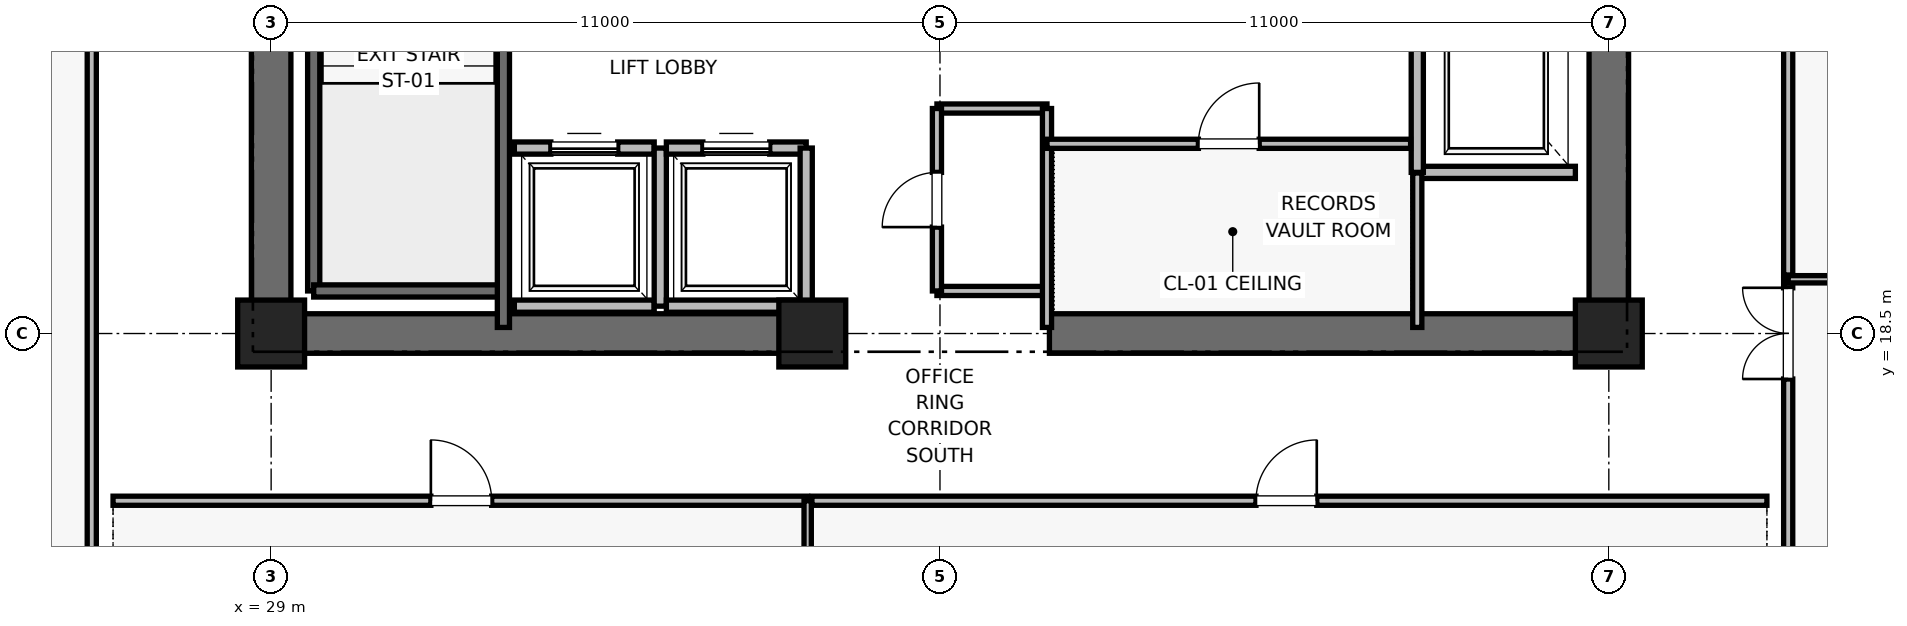
"""IFC4 building model, lengths in metres.
Left out: names, types, materials, properties, quantities, classifications, styles, units other than length and angle.
Written with IfcOpenShell. Run it as: python <this file> out.ifc"""

import sys

from ifc_helpers import new_model, si_unit, direction, frame, frame_2d, origin, origin_2d, place, context, subcontext, project, spatial, rectangle, extrude, element, fill, save


model = new_model("IFC4")
c1 = context("Model", 3, precision=1e-05, world=origin(), true_north=direction((0.0, 1.0)))
c2 = subcontext(c1, "Body", "Model", "MODEL_VIEW")
j1 = project(units=[si_unit("LENGTHUNIT", "METRE"), si_unit("PLANEANGLEUNIT", "RADIAN")], contexts=[c1])
p1 = place(None, origin())
s1 = spatial("IfcSite", under=j1, at=p1, CompositionType="ELEMENT")
p2 = place(p1, origin())
s2 = spatial("IfcBuilding", under=s1, at=p2, CompositionType="ELEMENT")
p3 = place(p2, frame((0.0, 0.0, 55.6)))
s3 = spatial("IfcBuildingStorey", under=s2, at=p3, CompositionType="ELEMENT", Elevation=55.6)
for number, where, z_axis, x_axis in (
    (1, (29.0, 18.5, 0.0), (0.0, 0.0, 1.0), (1.0, 0.0, 0.0)),
    (2, (51.0, 18.5, 0.0), (0.0, 0.0, 1.0), (1.0, 0.0, 0.0)),
    (3, (37.9, 18.5, 0.0), (0.0, 0.0, 1.0), (1.0, 0.0, 0.0)),
):
    element("IfcColumn", number, at=place(p3, frame(where, z_axis=z_axis, x_axis=x_axis)), inside=s3, PredefinedType="PILASTER", context=c2, shape_type="SweptSolid", body=[
        extrude(rectangle(XDim=1.1, YDim=1.1, at=origin_2d()), origin(), (0.0, 0.0, 1.0), 4.0),
    ])
for number, where, z_axis, x_axis in (
    (4, (29.0, 18.5, 0.0), (0.0, 0.0, 1.0), (1.0, 0.0, 0.0)),
    (5, (41.8, 18.5, 0.0), (0.0, 0.0, 1.0), (1.0, 0.0, 0.0)),
):
    element("IfcWall", number, at=place(p3, frame(where, z_axis=z_axis, x_axis=x_axis)), inside=s3, PredefinedType="SHEAR", context=c2, shape_type="SweptSolid", body=[
        extrude(rectangle(XDim=9.2, YDim=0.65, at=frame_2d((4.6, 0.0))), origin(), (0.0, 0.0, 1.0), 3.76),
    ])
p4 = place(p3, frame((29.0, 18.5, 0.0), z_axis=(0.0, 0.0, 1.0), x_axis=(0.0, 1.0, 0.0)))
e6 = element("IfcWall", 6, at=p4, inside=s3, PredefinedType="SHEAR", context=c2, shape_type="SweptSolid", body=[
    extrude(rectangle(XDim=8.8, YDim=0.65, at=frame_2d((4.4, 0.0))), origin(), (0.0, 0.0, 1.0), 3.76),
])
p5 = place(p3, frame((51.0, 18.5, 0.0), z_axis=(0.0, 0.0, 1.0), x_axis=(0.0, 1.0, 0.0)))
e7 = element("IfcWall", 7, at=p5, inside=s3, PredefinedType="SHEAR", context=c2, shape_type="SweptSolid", body=[
    extrude(rectangle(XDim=5.8, YDim=0.65, at=frame_2d((2.9, 0.0))), origin(), (0.0, 0.0, 1.0), 3.76),
])
p6 = place(p3, frame((29.7, 19.2, 0.0), z_axis=(0.0, 0.0, 1.0), x_axis=(0.0, 1.0, 0.0)))
e8 = element("IfcWall", 8, at=p6, inside=s3, PredefinedType="SOLIDWALL", context=c2, shape_type="SweptSolid", body=[
    extrude(rectangle(XDim=8.15, YDim=0.2, at=frame_2d((4.075, 0.0))), origin(), (0.0, 0.0, 1.0), 3.76),
])
p7 = place(p3, frame((29.7, 19.2, 0.0), z_axis=(0.0, 0.0, 1.0), x_axis=(1.0, 0.0, 0.0)))
e9 = element("IfcWall", 9, at=p7, inside=s3, PredefinedType="SOLIDWALL", context=c2, shape_type="SweptSolid", body=[
    extrude(rectangle(XDim=3.12, YDim=0.2, at=frame_2d((1.56, 0.0))), origin(), (0.0, 0.0, 1.0), 3.76),
])
p8 = place(p3, frame((32.82, 18.6, 0.0), z_axis=(0.0, 0.0, 1.0), x_axis=(0.0, 1.0, 0.0)))
e10 = element("IfcWall", 10, at=p8, inside=s3, PredefinedType="SOLIDWALL", context=c2, shape_type="SweptSolid", body=[
    extrude(rectangle(XDim=8.78, YDim=0.2, at=frame_2d((4.39, 0.0))), origin(), (0.0, 0.0, 1.0), 3.76),
])
p9 = place(p3, frame((47.85, 21.15, 0.0), z_axis=(0.0, 0.0, 1.0), x_axis=(1.0, 0.0, 0.0)))
e11 = element("IfcWall", 11, at=p9, inside=s3, PredefinedType="SOLIDWALL", context=c2, shape_type="SweptSolid", body=[
    extrude(rectangle(XDim=2.6, YDim=0.2, at=frame_2d((1.3, 0.0))), origin(), (0.0, 0.0, 1.0), 3.76),
])
p10 = place(p3, frame((47.85, 24.15, 0.0), z_axis=(0.0, 0.0, 1.0), x_axis=(0.0, -1.0, 0.0)))
e12 = element("IfcWall", 12, at=p10, inside=s3, PredefinedType="SOLIDWALL", context=c2, shape_type="SweptSolid", body=[
    extrude(rectangle(XDim=3.0, YDim=0.2, at=frame_2d((1.5, 0.0))), origin(), (0.0, 0.0, 1.0), 3.76),
])
p11 = place(p3, frame((33.0, 18.95, 0.0), z_axis=(0.0, 0.0, 1.0), x_axis=(1.0, 0.0, 0.0)))
e13 = element("IfcWall", 13, at=p11, inside=s3, PredefinedType="SOLIDWALL", context=c2, shape_type="SweptSolid", body=[
    extrude(rectangle(XDim=2.3, YDim=0.2, at=frame_2d((1.15, 0.0))), origin(), (0.0, 0.0, 1.0), 3.76),
])
p12 = place(p3, frame((35.3, 21.55, 0.0), z_axis=(0.0, 0.0, 1.0), x_axis=(-1.0, 0.0, 0.0)))
e14 = element("IfcWall", 14, at=p12, inside=s3, PredefinedType="SOLIDWALL", context=c2, shape_type="SweptSolid", body=[
    extrude(rectangle(XDim=2.3, YDim=0.2, at=frame_2d((1.15, 0.0))), origin(), (0.0, 0.0, 1.0), 3.76),
])
p13 = place(p12, frame((0.6, 0.0, 0.0)))
e15 = element("IfcOpeningElement", 15, at=p13, cuts=e14, PredefinedType="OPENING", context=c2, shape_type="SweptSolid", body=[
    extrude(rectangle(XDim=1.1, YDim=2.2, at=frame_2d((0.55, 1.1))), frame((0.0, 0.1, 0.0), z_axis=(0.0, -1.0, 0.0), x_axis=(1.0, 0.0, 0.0)), (0.0, 0.0, 1.0), 0.2),
])
p14 = place(p3, frame((35.4, 18.95, 0.0), z_axis=(0.0, 0.0, 1.0), x_axis=(0.0, 1.0, 0.0)))
e16 = element("IfcWall", 16, at=p14, inside=s3, PredefinedType="SOLIDWALL", context=c2, shape_type="SweptSolid", body=[
    extrude(rectangle(XDim=2.6, YDim=0.2, at=frame_2d((1.3, 0.0))), origin(), (0.0, 0.0, 1.0), 3.76),
])
p15 = place(p3, frame((35.5, 18.95, 0.0), z_axis=(0.0, 0.0, 1.0), x_axis=(1.0, 0.0, 0.0)))
e17 = element("IfcWall", 17, at=p15, inside=s3, PredefinedType="SOLIDWALL", context=c2, shape_type="SweptSolid", body=[
    extrude(rectangle(XDim=2.3, YDim=0.2, at=frame_2d((1.15, 0.0))), origin(), (0.0, 0.0, 1.0), 2.54),
])
p16 = place(p3, frame((37.8, 21.55, 0.0), z_axis=(0.0, 0.0, 1.0), x_axis=(-1.0, 0.0, 0.0)))
e18 = element("IfcWall", 18, at=p16, inside=s3, PredefinedType="SOLIDWALL", context=c2, shape_type="SweptSolid", body=[
    extrude(rectangle(XDim=2.3, YDim=0.2, at=frame_2d((1.15, 0.0))), origin(), (0.0, 0.0, 1.0), 3.76),
])
p17 = place(p16, frame((0.6, 0.0, 0.0)))
e19 = element("IfcOpeningElement", 19, at=p17, cuts=e18, PredefinedType="OPENING", context=c2, shape_type="SweptSolid", body=[
    extrude(rectangle(XDim=1.1, YDim=2.2, at=frame_2d((0.55, 1.1))), frame((0.0, 0.1, 0.0), z_axis=(0.0, -1.0, 0.0), x_axis=(1.0, 0.0, 0.0)), (0.0, 0.0, 1.0), 0.2),
])
p18 = place(p3, frame((37.8, 18.95, 0.0), z_axis=(0.0, 0.0, 1.0), x_axis=(0.0, 1.0, 0.0)))
e20 = element("IfcWall", 20, at=p18, inside=s3, PredefinedType="SOLIDWALL", context=c2, shape_type="SweptSolid", body=[
    extrude(rectangle(XDim=2.6, YDim=0.2, at=frame_2d((1.3, 0.0))), origin(), (0.0, 0.0, 1.0), 2.54),
])
for number, where, z_axis, x_axis in (
    (21, (39.95, 19.2, 0.0), (0.0, 0.0, 1.0), (1.0, 0.0, 0.0)),
    (22, (39.95, 22.2, 0.0), (0.0, 0.0, 1.0), (1.0, 0.0, 0.0)),
):
    element("IfcWall", number, at=place(p3, frame(where, z_axis=z_axis, x_axis=x_axis)), inside=s3, PredefinedType="PARTITIONING", context=c2, shape_type="SweptSolid", body=[
        extrude(rectangle(XDim=1.81, YDim=0.15, at=frame_2d((0.905, 0.0))), origin(), (0.0, 0.0, 1.0), 2.85),
    ])
p19 = place(p3, frame((41.76, 18.6, 0.0), z_axis=(0.0, 0.0, 1.0), x_axis=(0.0, 1.0, 0.0)))
e23 = element("IfcWall", 23, at=p19, inside=s3, PredefinedType="PARTITIONING", context=c2, shape_type="SweptSolid", body=[
    extrude(rectangle(XDim=3.6, YDim=0.15, at=frame_2d((1.8, 0.0))), origin(), (0.0, 0.0, 1.0), 2.54),
])
p20 = place(p3, frame((39.95, 19.2, 0.0), z_axis=(0.0, 0.0, 1.0), x_axis=(0.0, 1.0, 0.0)))
e24 = element("IfcWall", 24, at=p20, inside=s3, PredefinedType="PARTITIONING", context=c2, shape_type="SweptSolid", body=[
    extrude(rectangle(XDim=3.0, YDim=0.15, at=frame_2d((1.5, 0.0))), origin(), (0.0, 0.0, 1.0), 2.85),
])
p21 = place(p20, frame((1.05, 0.0, 0.0)))
e25 = element("IfcOpeningElement", 25, at=p21, cuts=e24, PredefinedType="OPENING", context=c2, shape_type="SweptSolid", body=[
    extrude(rectangle(XDim=0.9, YDim=2.1, at=frame_2d((0.45, 1.05))), frame((0.0, 0.075, 0.0), z_axis=(0.0, -1.0, 0.0), x_axis=(1.0, 0.0, 0.0)), (0.0, 0.0, 1.0), 0.15),
])
p22 = place(p3, frame((47.85, 18.6, 0.0), z_axis=(0.0, 0.0, 1.0), x_axis=(0.0, 1.0, 0.0)))
e26 = element("IfcWall", 26, at=p22, inside=s3, PredefinedType="PARTITIONING", context=c2, shape_type="SweptSolid", body=[
    extrude(rectangle(XDim=2.54, YDim=0.15, at=frame_2d((1.27, 0.0))), origin(), (0.0, 0.0, 1.0), 2.85),
])
p23 = place(p3, frame((41.76, 21.62, 0.0), z_axis=(0.0, 0.0, 1.0), x_axis=(1.0, 0.0, 0.0)))
e27 = element("IfcWall", 27, at=p23, inside=s3, PredefinedType="PARTITIONING", context=c2, shape_type="SweptSolid", body=[
    extrude(rectangle(XDim=5.98, YDim=0.15, at=frame_2d((2.99, 0.0))), origin(), (0.0, 0.0, 1.0), 2.85),
])
p24 = place(p23, frame((2.49, 0.0, 0.0)))
e28 = element("IfcOpeningElement", 28, at=p24, cuts=e27, PredefinedType="OPENING", context=c2, shape_type="SweptSolid", body=[
    extrude(rectangle(XDim=1.0, YDim=2.15, at=frame_2d((0.5, 1.075))), frame((0.0, 0.075, 0.0), z_axis=(0.0, -1.0, 0.0), x_axis=(1.0, 0.0, 0.0)), (0.0, 0.0, 1.0), 0.15),
])
p25 = place(p3, frame((26.4, 15.75, 0.0), z_axis=(0.0, 0.0, 1.0), x_axis=(1.0, 0.0, 0.0)))
e29 = element("IfcWall", 29, at=p25, inside=s3, PredefinedType="PARTITIONING", context=c2, shape_type="SweptSolid", body=[
    extrude(rectangle(XDim=11.424, YDim=0.15, at=frame_2d((5.712, 0.0))), origin(), (0.0, 0.0, 1.0), 2.85),
])
p26 = place(p25, frame((5.227, 0.0, 0.0)))
e30 = element("IfcOpeningElement", 30, at=p26, cuts=e29, PredefinedType="OPENING", context=c2, shape_type="SweptSolid", body=[
    extrude(rectangle(XDim=1.0, YDim=2.15, at=frame_2d((0.5, 1.075))), frame((0.0, 0.075, 0.0), z_axis=(0.0, -1.0, 0.0), x_axis=(1.0, 0.0, 0.0)), (0.0, 0.0, 1.0), 0.15),
])
p27 = place(p3, frame((37.824, 5.373, 0.0), z_axis=(0.0, 0.0, 1.0), x_axis=(0.0, 1.0, 0.0)))
e31 = element("IfcWall", 31, at=p27, inside=s3, PredefinedType="PARTITIONING", context=c2, shape_type="SweptSolid", body=[
    extrude(rectangle(XDim=10.377, YDim=0.12, at=frame_2d((5.188, 0.0))), origin(), (0.0, 0.0, 1.0), 2.39),
])
p28 = place(p3, frame((37.894, 15.75, 0.0), z_axis=(0.0, 0.0, 1.0), x_axis=(1.0, 0.0, 0.0)))
e32 = element("IfcWall", 32, at=p28, inside=s3, PredefinedType="PARTITIONING", context=c2, shape_type="SweptSolid", body=[
    extrude(rectangle(XDim=15.706, YDim=0.15, at=frame_2d((7.853, 0.0))), origin(), (0.0, 0.0, 1.0), 2.85),
])
p29 = place(p28, frame((7.303, 0.0, 0.0)))
e33 = element("IfcOpeningElement", 33, at=p29, cuts=e32, PredefinedType="OPENING", context=c2, shape_type="SweptSolid", body=[
    extrude(rectangle(XDim=1.0, YDim=2.15, at=frame_2d((0.5, 1.075))), frame((0.0, 0.075, 0.0), z_axis=(0.0, -1.0, 0.0), x_axis=(1.0, 0.0, 0.0)), (0.0, 0.0, 1.0), 0.15),
])
p30 = place(p3, frame((26.05, 9.073, 0.0), z_axis=(0.0, 0.0, 1.0), x_axis=(0.0, 1.0, 0.0)))
e34 = element("IfcWall", 34, at=p30, inside=s3, PredefinedType="PARTITIONING", context=c2, shape_type="SweptSolid", body=[
    extrude(rectangle(XDim=21.376, YDim=0.15, at=frame_2d((10.688, 0.0))), origin(), (0.0, 0.0, 1.0), 2.85),
])
p31 = place(p30, frame((14.917, 0.0, 0.0)))
e35 = element("IfcOpeningElement", 35, at=p31, cuts=e34, PredefinedType="OPENING", context=c2, shape_type="SweptSolid", body=[
    extrude(rectangle(XDim=1.0, YDim=2.15, at=frame_2d((0.5, 1.075))), frame((0.0, 0.075, 0.0), z_axis=(0.0, -1.0, 0.0), x_axis=(1.0, 0.0, 0.0)), (0.0, 0.0, 1.0), 0.15),
])
p32 = place(p3, frame((53.95, 9.073, 0.0), z_axis=(0.0, 0.0, 1.0), x_axis=(0.0, 1.0, 0.0)))
e36 = element("IfcWall", 36, at=p32, inside=s3, PredefinedType="PARTITIONING", context=c2, shape_type="SweptSolid", body=[
    extrude(rectangle(XDim=10.319, YDim=0.15, at=frame_2d((5.16, 0.0))), origin(), (0.0, 0.0, 1.0), 2.85),
])
p33 = place(p32, frame((8.679, 0.0, 0.0)))
e37 = element("IfcOpeningElement", 37, at=p33, cuts=e36, PredefinedType="OPENING", context=c2, shape_type="SweptSolid", body=[
    extrude(rectangle(XDim=1.5, YDim=2.25, at=frame_2d((0.75, 1.125))), frame((0.0, 0.075, 0.0), z_axis=(0.0, -1.0, 0.0), x_axis=(1.0, 0.0, 0.0)), (0.0, 0.0, 1.0), 0.15),
])
p34 = place(p3, frame((53.95, 19.392, 0.0), z_axis=(0.0, 0.0, 1.0), x_axis=(1.0, 0.0, 0.0)))
e38 = element("IfcWall", 38, at=p34, inside=s3, PredefinedType="PARTITIONING", context=c2, shape_type="SweptSolid", body=[
    extrude(rectangle(XDim=11.646, YDim=0.12, at=frame_2d((5.823, 0.0))), origin(), (0.0, 0.0, 1.0), 2.85),
])
p35 = place(p3, frame((53.95, 19.462, 0.0), z_axis=(0.0, 0.0, 1.0), x_axis=(0.0, 1.0, 0.0)))
e39 = element("IfcWall", 39, at=p35, inside=s3, PredefinedType="PARTITIONING", context=c2, shape_type="SweptSolid", body=[
    extrude(rectangle(XDim=12.461, YDim=0.15, at=frame_2d((6.23, 0.0))), origin(), (0.0, 0.0, 1.0), 2.85),
])
p36 = place(p35, frame((5.695, 0.0, 0.0)))
e40 = element("IfcOpeningElement", 40, at=p36, cuts=e39, PredefinedType="OPENING", context=c2, shape_type="SweptSolid", body=[
    extrude(rectangle(XDim=1.0, YDim=2.15, at=frame_2d((0.5, 1.075))), frame((0.0, 0.075, 0.0), z_axis=(0.0, -1.0, 0.0), x_axis=(1.0, 0.0, 0.0)), (0.0, 0.0, 1.0), 0.15),
])
p37 = place(p13, origin())
e41 = element("IfcDoor", 41, at=p37, inside=s3, OperationType="SLIDING_TO_RIGHT", PredefinedType="DOOR", context=c2, shape_type="SweptSolid", body=[
    extrude(rectangle(XDim=1.1, YDim=2.2, at=frame_2d((0.55, 1.1))), frame((0.0, 0.025, 0.0), z_axis=(0.0, -1.0, 0.0), x_axis=(1.0, 0.0, 0.0)), (0.0, 0.0, 1.0), 0.05),
])
fill(e15, e41)
p38 = place(p17, origin())
e42 = element("IfcDoor", 42, at=p38, inside=s3, OperationType="SLIDING_TO_RIGHT", PredefinedType="DOOR", context=c2, shape_type="SweptSolid", body=[
    extrude(rectangle(XDim=1.1, YDim=2.2, at=frame_2d((0.55, 1.1))), frame((0.0, 0.025, 0.0), z_axis=(0.0, -1.0, 0.0), x_axis=(1.0, 0.0, 0.0)), (0.0, 0.0, 1.0), 0.05),
])
fill(e19, e42)
p39 = place(p21, origin())
e43 = element("IfcDoor", 43, at=p39, inside=s3, OperationType="SINGLE_SWING_LEFT", PredefinedType="DOOR", context=c2, shape_type="SweptSolid", body=[
    extrude(rectangle(XDim=0.9, YDim=2.1, at=frame_2d((0.45, 1.05))), frame((0.0, 0.025, 0.0), z_axis=(0.0, -1.0, 0.0), x_axis=(1.0, 0.0, 0.0)), (0.0, 0.0, 1.0), 0.05),
])
fill(e25, e43)
p40 = place(p24, origin())
e44 = element("IfcDoor", 44, at=p40, inside=s3, OperationType="SINGLE_SWING_RIGHT", PredefinedType="DOOR", context=c2, shape_type="SweptSolid", body=[
    extrude(rectangle(XDim=1.0, YDim=2.15, at=frame_2d((0.5, 1.075))), frame((0.0, 0.025, 0.0), z_axis=(0.0, -1.0, 0.0), x_axis=(1.0, 0.0, 0.0)), (0.0, 0.0, 1.0), 0.05),
])
fill(e28, e44)
p41 = place(p26, origin())
e45 = element("IfcDoor", 45, at=p41, inside=s3, OperationType="SINGLE_SWING_LEFT", PredefinedType="DOOR", context=c2, shape_type="SweptSolid", body=[
    extrude(rectangle(XDim=1.0, YDim=2.15, at=frame_2d((0.5, 1.075))), frame((0.0, 0.025, 0.0), z_axis=(0.0, -1.0, 0.0), x_axis=(1.0, 0.0, 0.0)), (0.0, 0.0, 1.0), 0.05),
])
fill(e30, e45)
p42 = place(p29, origin())
e46 = element("IfcDoor", 46, at=p42, inside=s3, OperationType="SINGLE_SWING_RIGHT", PredefinedType="DOOR", context=c2, shape_type="SweptSolid", body=[
    extrude(rectangle(XDim=1.0, YDim=2.15, at=frame_2d((0.5, 1.075))), frame((0.0, 0.025, 0.0), z_axis=(0.0, -1.0, 0.0), x_axis=(1.0, 0.0, 0.0)), (0.0, 0.0, 1.0), 0.05),
])
fill(e33, e46)
p43 = place(p33, origin())
e47 = element("IfcDoor", 47, at=p43, inside=s3, OperationType="DOUBLE_DOOR_SINGLE_SWING", PredefinedType="DOOR", context=c2, shape_type="SweptSolid", body=[
    extrude(rectangle(XDim=1.5, YDim=2.25, at=frame_2d((0.75, 1.125))), frame((0.0, 0.025, 0.0), z_axis=(0.0, -1.0, 0.0), x_axis=(1.0, 0.0, 0.0)), (0.0, 0.0, 1.0), 0.05),
])
fill(e37, e47)
save(model, sys.argv[1])
